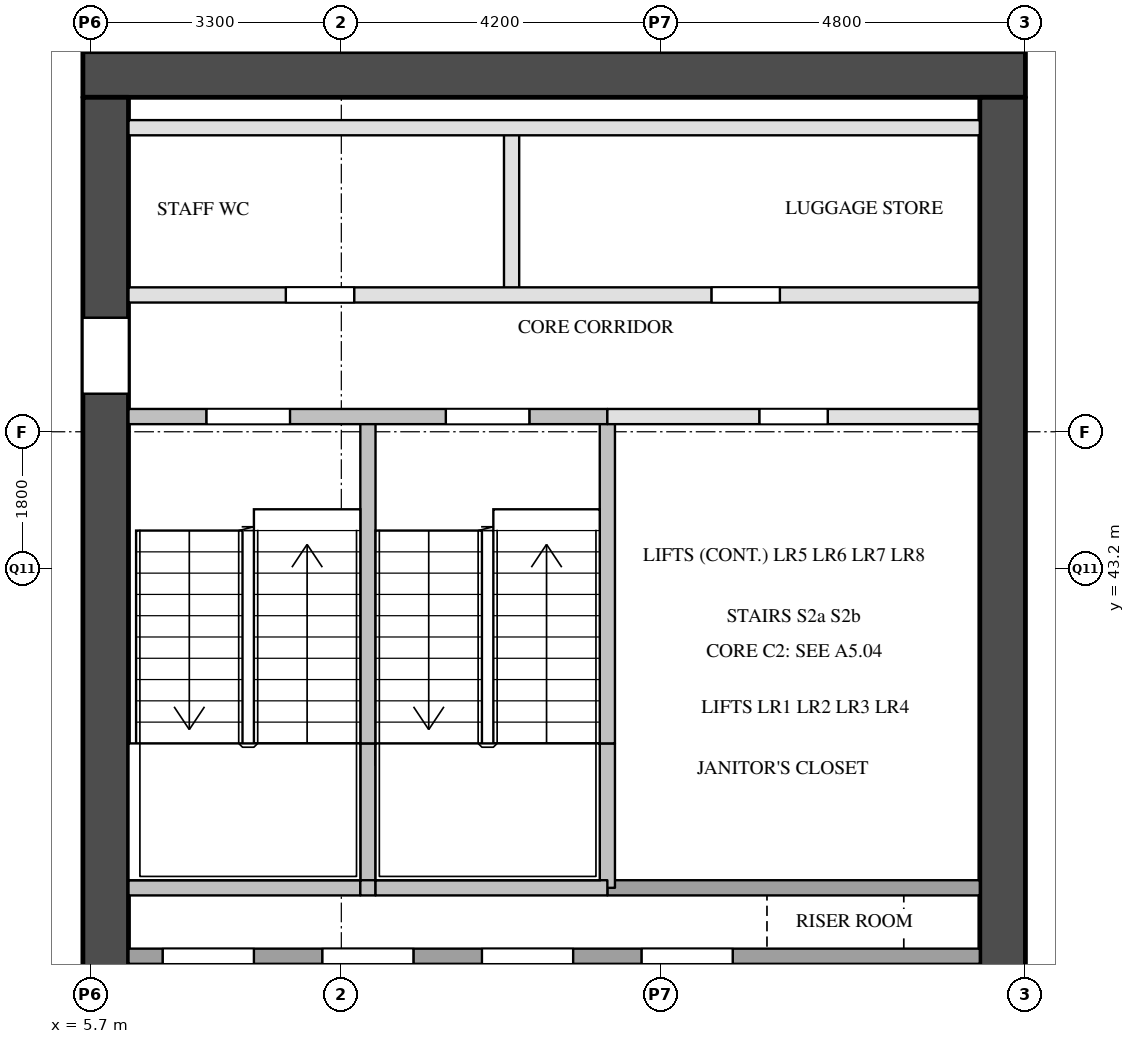
"""IFC4 building model, lengths in metres.
Left out: names, types, materials, properties, quantities, classifications, styles, units other than length and angle.
Written with IfcOpenShell. Run it as: python <this file> out.ifc"""

import sys

from ifc_helpers import new_model, si_unit, direction, frame, frame_2d, origin, place, context, subcontext, project, spatial, rectangle, extrude, element, fill, save


model = new_model("IFC4")
c1 = context("Model", 3, precision=1e-05, world=origin(), true_north=direction((0.0, 1.0)))
c2 = subcontext(c1, "Body", "Model", "MODEL_VIEW")
j1 = project(units=[si_unit("LENGTHUNIT", "METRE"), si_unit("PLANEANGLEUNIT", "RADIAN")], contexts=[c1])
p1 = place(None, origin())
s1 = spatial("IfcSite", under=j1, at=p1, CompositionType="ELEMENT")
p2 = place(p1, origin())
s2 = spatial("IfcBuilding", under=s1, at=p2, CompositionType="ELEMENT")
p3 = place(p2, frame((0.0, 0.0, 34.8)))
s3 = spatial("IfcBuildingStorey", under=s2, at=p3, CompositionType="ELEMENT", Elevation=34.8)
p4 = place(p3, frame((5.6, 49.7, 0.0), z_axis=(0.0, 0.0, 1.0), x_axis=(1.0, 0.0, 0.0)))
e1 = element("IfcWall", 1, at=p4, inside=s3, PredefinedType="SHEAR", context=c2, shape_type="SweptSolid", body=[
    extrude(rectangle(XDim=12.4, YDim=0.6, at=frame_2d((6.2, 0.0))), origin(), (0.0, 0.0, 1.0), 3.5),
])
p5 = place(p3, frame((5.9, 29.1, 0.0), z_axis=(0.0, 0.0, 1.0), x_axis=(0.0, 1.0, 0.0)))
e2 = element("IfcWall", 2, at=p5, inside=s3, PredefinedType="SHEAR", context=c2, shape_type="SweptSolid", body=[
    extrude(rectangle(XDim=20.3, YDim=0.6, at=frame_2d((10.15, 0.0))), origin(), (0.0, 0.0, 1.0), 3.5),
])
p6 = place(p5, frame((3.6, 0.0, 0.0)))
e3 = element("IfcOpeningElement", 3, at=p6, cuts=e2, PredefinedType="OPENING", context=c2, shape_type="SweptSolid", body=[
    extrude(rectangle(XDim=1.8, YDim=2.1, at=frame_2d((0.9, 1.05))), frame((0.0, 0.31, 0.0), z_axis=(0.0, -1.0, 0.0), x_axis=(1.0, 0.0, 0.0)), (0.0, 0.0, 1.0), 0.62),
])
p7 = place(p5, frame((16.4, 0.0, 0.0)))
e4 = element("IfcOpeningElement", 4, at=p7, cuts=e2, PredefinedType="OPENING", context=c2, shape_type="SweptSolid", body=[
    extrude(rectangle(XDim=1.0, YDim=2.1, at=frame_2d((0.5, 1.05))), frame((0.0, 0.31, 0.0), z_axis=(0.0, -1.0, 0.0), x_axis=(1.0, 0.0, 0.0)), (0.0, 0.0, 1.0), 0.62),
])
p8 = place(p3, frame((17.7, 29.1, 0.0), z_axis=(0.0, 0.0, 1.0), x_axis=(0.0, 1.0, 0.0)))
e5 = element("IfcWall", 5, at=p8, inside=s3, PredefinedType="SHEAR", context=c2, shape_type="SweptSolid", body=[
    extrude(rectangle(XDim=20.3, YDim=0.6, at=frame_2d((10.15, 0.0))), origin(), (0.0, 0.0, 1.0), 3.5),
])
p9 = place(p8, frame((1.25, 0.0, 0.0)))
e6 = element("IfcOpeningElement", 6, at=p9, cuts=e5, PredefinedType="OPENING", context=c2, shape_type="SweptSolid", body=[
    extrude(rectangle(XDim=0.7, YDim=2.1, at=frame_2d((0.35, 1.05))), frame((0.0, 0.31, 0.0), z_axis=(0.0, -1.0, 0.0), x_axis=(1.0, 0.0, 0.0)), (0.0, 0.0, 1.0), 0.62),
])
p10 = place(p8, frame((7.05, 0.0, 0.0)))
e7 = element("IfcOpeningElement", 7, at=p10, cuts=e5, PredefinedType="OPENING", context=c2, shape_type="SweptSolid", body=[
    extrude(rectangle(XDim=0.7, YDim=2.1, at=frame_2d((0.35, 1.05))), frame((0.0, 0.31, 0.0), z_axis=(0.0, -1.0, 0.0), x_axis=(1.0, 0.0, 0.0)), (0.0, 0.0, 1.0), 0.62),
])
p11 = place(p3, frame((8.3, 34.9, 0.0), z_axis=(0.0, 0.0, 1.0), x_axis=(0.0, 1.0, 0.0)))
e8 = element("IfcWall", 8, at=p11, inside=s3, PredefinedType="SOLIDWALL", context=c2, shape_type="SweptSolid", body=[
    extrude(rectangle(XDim=3.2, YDim=0.2, at=frame_2d((1.6, 0.0))), origin(), (0.0, 0.0, 1.0), 3.5),
])
p12 = place(p3, frame((9.35, 39.0, 0.0), z_axis=(0.0, 0.0, 1.0), x_axis=(0.0, 1.0, 0.0)))
e9 = element("IfcWall", 9, at=p12, inside=s3, PredefinedType="SOLIDWALL", context=c2, shape_type="SweptSolid", body=[
    extrude(rectangle(XDim=1.9, YDim=0.2, at=frame_2d((0.95, 0.0))), origin(), (0.0, 0.0, 1.0), 3.5),
])
p13 = place(p3, frame((9.35, 40.9, 0.0), z_axis=(0.0, 0.0, 1.0), x_axis=(0.0, 1.0, 0.0)))
e10 = element("IfcWall", 10, at=p13, inside=s3, PredefinedType="SOLIDWALL", context=c2, shape_type="SweptSolid", body=[
    extrude(rectangle(XDim=4.3, YDim=0.2, at=frame_2d((2.15, 0.0))), origin(), (0.0, 0.0, 1.0), 3.5),
])
p14 = place(p3, frame((10.4, 34.9, 0.0), z_axis=(0.0, 0.0, 1.0), x_axis=(0.0, 1.0, 0.0)))
e11 = element("IfcWall", 11, at=p14, inside=s3, PredefinedType="SOLIDWALL", context=c2, shape_type="SweptSolid", body=[
    extrude(rectangle(XDim=3.2, YDim=0.2, at=frame_2d((1.6, 0.0))), origin(), (0.0, 0.0, 1.0), 3.5),
])
p15 = place(p3, frame((11.24, 46.8, 0.0), z_axis=(0.0, 0.0, 1.0), x_axis=(0.0, 1.0, 0.0)))
e12 = element("IfcWall", 12, at=p15, inside=s3, PredefinedType="PARTITIONING", context=c2, shape_type="SweptSolid", body=[
    extrude(rectangle(XDim=2.2, YDim=0.2, at=frame_2d((1.1, 0.0))), origin(), (0.0, 0.0, 1.0), 3.5),
])
p16 = place(p3, frame((12.5, 34.9, 0.0), z_axis=(0.0, 0.0, 1.0), x_axis=(0.0, 1.0, 0.0)))
e13 = element("IfcWall", 13, at=p16, inside=s3, PredefinedType="SOLIDWALL", context=c2, shape_type="SweptSolid", body=[
    extrude(rectangle(XDim=3.2, YDim=0.2, at=frame_2d((1.6, 0.0))), origin(), (0.0, 0.0, 1.0), 3.5),
])
p17 = place(p3, frame((12.5, 39.0, 0.0), z_axis=(0.0, 0.0, 1.0), x_axis=(0.0, 1.0, 0.0)))
e14 = element("IfcWall", 14, at=p17, inside=s3, PredefinedType="SOLIDWALL", context=c2, shape_type="SweptSolid", body=[
    extrude(rectangle(XDim=1.9, YDim=0.2, at=frame_2d((0.95, 0.0))), origin(), (0.0, 0.0, 1.0), 3.5),
])
p18 = place(p3, frame((12.5, 40.9, 0.0), z_axis=(0.0, 0.0, 1.0), x_axis=(0.0, 1.0, 0.0)))
e15 = element("IfcWall", 15, at=p18, inside=s3, PredefinedType="SOLIDWALL", context=c2, shape_type="SweptSolid", body=[
    extrude(rectangle(XDim=4.3, YDim=0.2, at=frame_2d((2.15, 0.0))), origin(), (0.0, 0.0, 1.0), 3.5),
])
for number, where, z_axis, x_axis in (
    (16, (14.6, 34.9, 0.0), (0.0, 0.0, 1.0), (0.0, 1.0, 0.0)),
    (17, (16.7, 34.9, 0.0), (0.0, 0.0, 1.0), (0.0, 1.0, 0.0)),
):
    element("IfcWall", number, at=place(p3, frame(where, z_axis=z_axis, x_axis=x_axis)), inside=s3, PredefinedType="SOLIDWALL", context=c2, shape_type="SweptSolid", body=[
        extrude(rectangle(XDim=3.2, YDim=0.2, at=frame_2d((1.6, 0.0))), origin(), (0.0, 0.0, 1.0), 3.5),
    ])
p19 = place(p3, frame((6.2, 38.1, 0.0), z_axis=(0.0, 0.0, 1.0), x_axis=(1.0, 0.0, 0.0)))
e18 = element("IfcWall", 18, at=p19, inside=s3, PredefinedType="SOLIDWALL", context=c2, shape_type="SweptSolid", body=[
    extrude(rectangle(XDim=11.2, YDim=0.2, at=frame_2d((5.6, 0.0))), origin(), (0.0, 0.0, 1.0), 3.5),
])
p20 = place(p19, frame((0.45, 0.0, 0.0)))
e19 = element("IfcOpeningElement", 19, at=p20, cuts=e18, PredefinedType="OPENING", context=c2, shape_type="SweptSolid", body=[
    extrude(rectangle(XDim=1.2, YDim=2.1, at=frame_2d((0.6, 1.05))), frame((0.0, 0.11, 0.0), z_axis=(0.0, -1.0, 0.0), x_axis=(1.0, 0.0, 0.0)), (0.0, 0.0, 1.0), 0.22),
])
p21 = place(p19, frame((2.55, 0.0, 0.0)))
e20 = element("IfcOpeningElement", 20, at=p21, cuts=e18, PredefinedType="OPENING", context=c2, shape_type="SweptSolid", body=[
    extrude(rectangle(XDim=1.2, YDim=2.1, at=frame_2d((0.6, 1.05))), frame((0.0, 0.11, 0.0), z_axis=(0.0, -1.0, 0.0), x_axis=(1.0, 0.0, 0.0)), (0.0, 0.0, 1.0), 0.22),
])
p22 = place(p19, frame((4.65, 0.0, 0.0)))
e21 = element("IfcOpeningElement", 21, at=p22, cuts=e18, PredefinedType="OPENING", context=c2, shape_type="SweptSolid", body=[
    extrude(rectangle(XDim=1.2, YDim=2.1, at=frame_2d((0.6, 1.05))), frame((0.0, 0.11, 0.0), z_axis=(0.0, -1.0, 0.0), x_axis=(1.0, 0.0, 0.0)), (0.0, 0.0, 1.0), 0.22),
])
p23 = place(p19, frame((6.75, 0.0, 0.0)))
e22 = element("IfcOpeningElement", 22, at=p23, cuts=e18, PredefinedType="OPENING", context=c2, shape_type="SweptSolid", body=[
    extrude(rectangle(XDim=1.2, YDim=2.1, at=frame_2d((0.6, 1.05))), frame((0.0, 0.11, 0.0), z_axis=(0.0, -1.0, 0.0), x_axis=(1.0, 0.0, 0.0)), (0.0, 0.0, 1.0), 0.22),
])
p24 = place(p3, frame((12.5, 39.0, 0.0), z_axis=(0.0, 0.0, 1.0), x_axis=(1.0, 0.0, 0.0)))
e23 = element("IfcWall", 23, at=p24, inside=s3, PredefinedType="SOLIDWALL", context=c2, shape_type="SweptSolid", body=[
    extrude(rectangle(XDim=4.9, YDim=0.2, at=frame_2d((2.45, 0.0))), origin(), (0.0, 0.0, 1.0), 3.5),
])
p25 = place(p3, frame((6.2, 39.0, 0.0), z_axis=(0.0, 0.0, 1.0), x_axis=(1.0, 0.0, 0.0)))
e24 = element("IfcWall", 24, at=p25, inside=s3, PredefinedType="SOLIDWALL", context=c2, shape_type="SweptSolid", body=[
    extrude(rectangle(XDim=3.05, YDim=0.2, at=frame_2d((1.525, 0.0))), origin(), (0.0, 0.0, 1.0), 3.5),
])
p26 = place(p3, frame((9.25, 39.0, 0.0), z_axis=(0.0, 0.0, 1.0), x_axis=(1.0, 0.0, 0.0)))
e25 = element("IfcWall", 25, at=p26, inside=s3, PredefinedType="SOLIDWALL", context=c2, shape_type="SweptSolid", body=[
    extrude(rectangle(XDim=0.2, YDim=0.2, at=frame_2d((0.1, 0.0))), origin(), (0.0, 0.0, 1.0), 3.5),
])
p27 = place(p3, frame((9.45, 39.0, 0.0), z_axis=(0.0, 0.0, 1.0), x_axis=(1.0, 0.0, 0.0)))
e26 = element("IfcWall", 26, at=p27, inside=s3, PredefinedType="SOLIDWALL", context=c2, shape_type="SweptSolid", body=[
    extrude(rectangle(XDim=3.05, YDim=0.2, at=frame_2d((1.525, 0.0))), origin(), (0.0, 0.0, 1.0), 3.5),
])
p28 = place(p3, frame((12.5, 45.2, 0.0), z_axis=(0.0, 0.0, 1.0), x_axis=(1.0, 0.0, 0.0)))
e27 = element("IfcWall", 27, at=p28, inside=s3, PredefinedType="PARTITIONING", context=c2, shape_type="SweptSolid", body=[
    extrude(rectangle(XDim=4.9, YDim=0.2, at=frame_2d((2.45, 0.0))), origin(), (0.0, 0.0, 1.0), 3.5),
])
p29 = place(p28, frame((2.0, 0.0, 0.0)))
e28 = element("IfcOpeningElement", 28, at=p29, cuts=e27, PredefinedType="OPENING", context=c2, shape_type="SweptSolid", body=[
    extrude(rectangle(XDim=0.9, YDim=2.1, at=frame_2d((0.45, 1.05))), frame((0.0, 0.11, 0.0), z_axis=(0.0, -1.0, 0.0), x_axis=(1.0, 0.0, 0.0)), (0.0, 0.0, 1.0), 0.22),
])
p30 = place(p3, frame((6.2, 45.2, 0.0), z_axis=(0.0, 0.0, 1.0), x_axis=(1.0, 0.0, 0.0)))
e29 = element("IfcWall", 29, at=p30, inside=s3, PredefinedType="SOLIDWALL", context=c2, shape_type="SweptSolid", body=[
    extrude(rectangle(XDim=6.3, YDim=0.2, at=frame_2d((3.15, 0.0))), origin(), (0.0, 0.0, 1.0), 3.5),
])
p31 = place(p30, frame((1.025, 0.0, 0.0)))
e30 = element("IfcOpeningElement", 30, at=p31, cuts=e29, PredefinedType="OPENING", context=c2, shape_type="SweptSolid", body=[
    extrude(rectangle(XDim=1.1, YDim=2.1, at=frame_2d((0.55, 1.05))), frame((0.0, 0.11, 0.0), z_axis=(0.0, -1.0, 0.0), x_axis=(1.0, 0.0, 0.0)), (0.0, 0.0, 1.0), 0.22),
])
p32 = place(p30, frame((4.175, 0.0, 0.0)))
e31 = element("IfcOpeningElement", 31, at=p32, cuts=e29, PredefinedType="OPENING", context=c2, shape_type="SweptSolid", body=[
    extrude(rectangle(XDim=1.1, YDim=2.1, at=frame_2d((0.55, 1.05))), frame((0.0, 0.11, 0.0), z_axis=(0.0, -1.0, 0.0), x_axis=(1.0, 0.0, 0.0)), (0.0, 0.0, 1.0), 0.22),
])
p33 = place(p3, frame((6.2, 46.8, 0.0), z_axis=(0.0, 0.0, 1.0), x_axis=(1.0, 0.0, 0.0)))
e32 = element("IfcWall", 32, at=p33, inside=s3, PredefinedType="PARTITIONING", context=c2, shape_type="SweptSolid", body=[
    extrude(rectangle(XDim=11.2, YDim=0.2, at=frame_2d((5.6, 0.0))), origin(), (0.0, 0.0, 1.0), 3.5),
])
p34 = place(p33, frame((2.07, 0.0, 0.0)))
e33 = element("IfcOpeningElement", 33, at=p34, cuts=e32, PredefinedType="OPENING", context=c2, shape_type="SweptSolid", body=[
    extrude(rectangle(XDim=0.9, YDim=2.1, at=frame_2d((0.45, 1.05))), frame((0.0, 0.11, 0.0), z_axis=(0.0, -1.0, 0.0), x_axis=(1.0, 0.0, 0.0)), (0.0, 0.0, 1.0), 0.22),
])
p35 = place(p33, frame((7.67, 0.0, 0.0)))
e34 = element("IfcOpeningElement", 34, at=p35, cuts=e32, PredefinedType="OPENING", context=c2, shape_type="SweptSolid", body=[
    extrude(rectangle(XDim=0.9, YDim=2.1, at=frame_2d((0.45, 1.05))), frame((0.0, 0.11, 0.0), z_axis=(0.0, -1.0, 0.0), x_axis=(1.0, 0.0, 0.0)), (0.0, 0.0, 1.0), 0.22),
])
p36 = place(p3, frame((6.2, 49.0, 0.0), z_axis=(0.0, 0.0, 1.0), x_axis=(1.0, 0.0, 0.0)))
e35 = element("IfcWall", 35, at=p36, inside=s3, PredefinedType="PARTITIONING", context=c2, shape_type="SweptSolid", body=[
    extrude(rectangle(XDim=11.2, YDim=0.2, at=frame_2d((5.6, 0.0))), origin(), (0.0, 0.0, 1.0), 3.5),
])
p37 = place(p20, origin())
e36 = element("IfcDoor", 36, at=p37, inside=s3, OperationType="SLIDING_TO_LEFT", PredefinedType="DOOR", context=c2, shape_type="SweptSolid", body=[
    extrude(rectangle(XDim=1.2, YDim=2.1, at=frame_2d((0.6, 1.05))), frame((0.0, 0.025, 0.0), z_axis=(0.0, -1.0, 0.0), x_axis=(1.0, 0.0, 0.0)), (0.0, 0.0, 1.0), 0.05),
])
fill(e19, e36)
p38 = place(p21, origin())
e37 = element("IfcDoor", 37, at=p38, inside=s3, OperationType="SLIDING_TO_LEFT", PredefinedType="DOOR", context=c2, shape_type="SweptSolid", body=[
    extrude(rectangle(XDim=1.2, YDim=2.1, at=frame_2d((0.6, 1.05))), frame((0.0, 0.025, 0.0), z_axis=(0.0, -1.0, 0.0), x_axis=(1.0, 0.0, 0.0)), (0.0, 0.0, 1.0), 0.05),
])
fill(e20, e37)
p39 = place(p22, origin())
e38 = element("IfcDoor", 38, at=p39, inside=s3, OperationType="SLIDING_TO_LEFT", PredefinedType="DOOR", context=c2, shape_type="SweptSolid", body=[
    extrude(rectangle(XDim=1.2, YDim=2.1, at=frame_2d((0.6, 1.05))), frame((0.0, 0.025, 0.0), z_axis=(0.0, -1.0, 0.0), x_axis=(1.0, 0.0, 0.0)), (0.0, 0.0, 1.0), 0.05),
])
fill(e21, e38)
p40 = place(p23, origin())
e39 = element("IfcDoor", 39, at=p40, inside=s3, OperationType="SLIDING_TO_LEFT", PredefinedType="DOOR", context=c2, shape_type="SweptSolid", body=[
    extrude(rectangle(XDim=1.2, YDim=2.1, at=frame_2d((0.6, 1.05))), frame((0.0, 0.025, 0.0), z_axis=(0.0, -1.0, 0.0), x_axis=(1.0, 0.0, 0.0)), (0.0, 0.0, 1.0), 0.05),
])
fill(e22, e39)
p41 = place(p31, origin())
e40 = element("IfcDoor", 40, at=p41, inside=s3, OperationType="SINGLE_SWING_LEFT", PredefinedType="DOOR", context=c2, shape_type="SweptSolid", body=[
    extrude(rectangle(XDim=1.1, YDim=2.1, at=frame_2d((0.55, 1.05))), frame((0.0, 0.025, 0.0), z_axis=(0.0, -1.0, 0.0), x_axis=(1.0, 0.0, 0.0)), (0.0, 0.0, 1.0), 0.05),
])
fill(e30, e40)
p42 = place(p32, origin())
e41 = element("IfcDoor", 41, at=p42, inside=s3, OperationType="SINGLE_SWING_RIGHT", PredefinedType="DOOR", context=c2, shape_type="SweptSolid", body=[
    extrude(rectangle(XDim=1.1, YDim=2.1, at=frame_2d((0.55, 1.05))), frame((0.0, 0.025, 0.0), z_axis=(0.0, -1.0, 0.0), x_axis=(1.0, 0.0, 0.0)), (0.0, 0.0, 1.0), 0.05),
])
fill(e31, e41)
p43 = place(p7, origin())
e42 = element("IfcDoor", 42, at=p43, inside=s3, OperationType="SINGLE_SWING_RIGHT", PredefinedType="DOOR", context=c2, shape_type="SweptSolid", body=[
    extrude(rectangle(XDim=1.0, YDim=2.1, at=frame_2d((0.5, 1.05))), frame((0.0, 0.025, 0.0), z_axis=(0.0, -1.0, 0.0), x_axis=(1.0, 0.0, 0.0)), (0.0, 0.0, 1.0), 0.05),
])
fill(e4, e42)
p44 = place(p34, origin())
e43 = element("IfcDoor", 43, at=p44, inside=s3, OperationType="SINGLE_SWING_LEFT", PredefinedType="DOOR", context=c2, shape_type="SweptSolid", body=[
    extrude(rectangle(XDim=0.9, YDim=2.1, at=frame_2d((0.45, 1.05))), frame((0.0, 0.025, 0.0), z_axis=(0.0, -1.0, 0.0), x_axis=(1.0, 0.0, 0.0)), (0.0, 0.0, 1.0), 0.05),
])
fill(e33, e43)
p45 = place(p35, origin())
e44 = element("IfcDoor", 44, at=p45, inside=s3, OperationType="SINGLE_SWING_RIGHT", PredefinedType="DOOR", context=c2, shape_type="SweptSolid", body=[
    extrude(rectangle(XDim=0.9, YDim=2.1, at=frame_2d((0.45, 1.05))), frame((0.0, 0.025, 0.0), z_axis=(0.0, -1.0, 0.0), x_axis=(1.0, 0.0, 0.0)), (0.0, 0.0, 1.0), 0.05),
])
fill(e34, e44)
p46 = place(p29, origin())
e45 = element("IfcDoor", 45, at=p46, inside=s3, OperationType="SINGLE_SWING_RIGHT", PredefinedType="DOOR", context=c2, shape_type="SweptSolid", body=[
    extrude(rectangle(XDim=0.9, YDim=2.1, at=frame_2d((0.45, 1.05))), frame((0.0, 0.025, 0.0), z_axis=(0.0, -1.0, 0.0), x_axis=(1.0, 0.0, 0.0)), (0.0, 0.0, 1.0), 0.05),
])
fill(e28, e45)
save(model, sys.argv[1])
